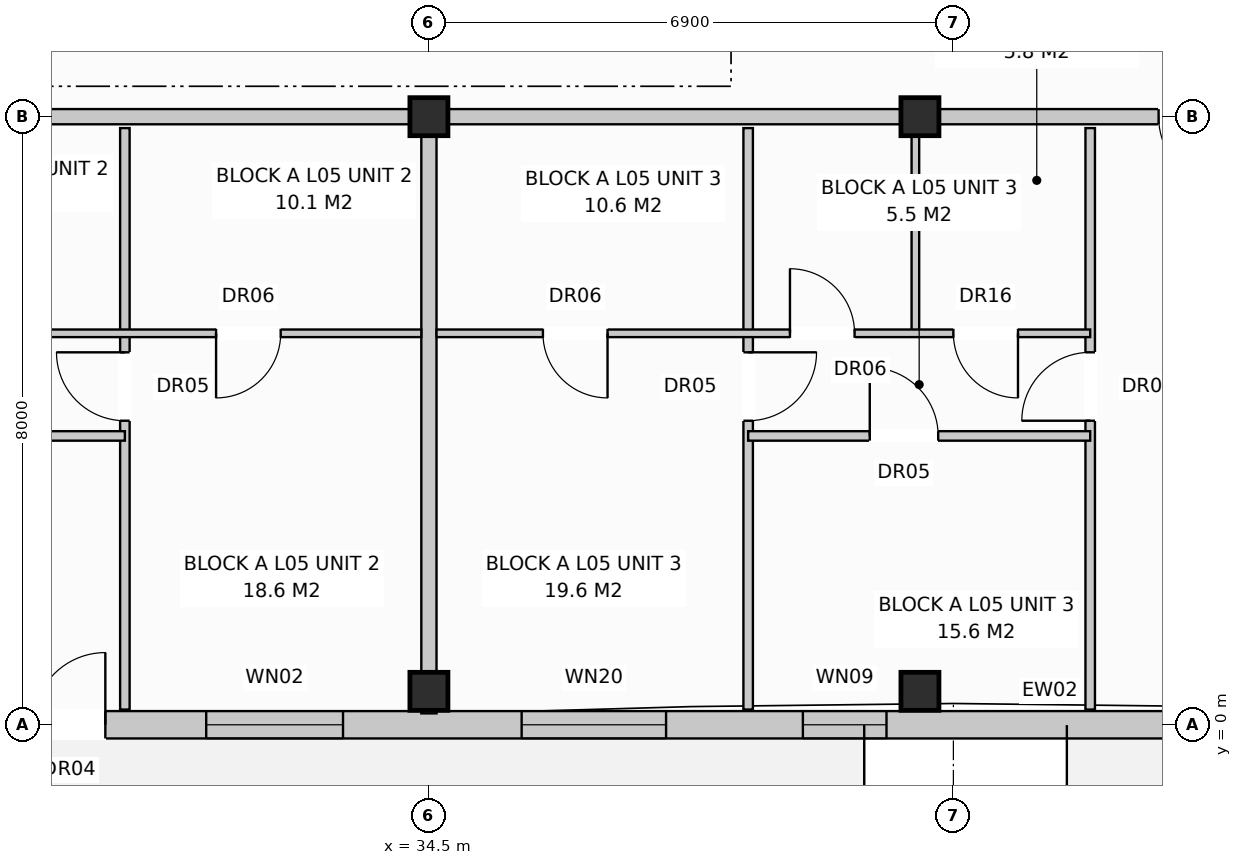
"""IFC4 building model, lengths in metres.
Left out: names, types, materials, properties, quantities, classifications, styles, units other than length and angle.
Written with IfcOpenShell. Run it as: python <this file> out.ifc"""

import sys

from ifc_helpers import new_model, si_unit, direction, frame, frame_2d, origin, origin_with_axes, origin_2d, place, context, subcontext, project, spatial, rectangle, extrude, element, fill, save


model = new_model("IFC4")
c1 = context("Model", 3, precision=1e-05, world=origin(), true_north=direction((0.0, 1.0)))
c2 = subcontext(c1, "Body", "Model", "MODEL_VIEW")
j1 = project(units=[si_unit("LENGTHUNIT", "METRE"), si_unit("PLANEANGLEUNIT", "RADIAN")], contexts=[c1])
p1 = place(None, origin())
s1 = spatial("IfcSite", under=j1, at=p1, CompositionType="ELEMENT")
p2 = place(p1, origin())
s2 = spatial("IfcBuilding", under=s1, at=p2, CompositionType="ELEMENT")
p3 = place(p2, frame((0.0, 0.0, 17.6)))
s3 = spatial("IfcBuildingStorey", under=s2, at=p3, CompositionType="ELEMENT", Elevation=17.6)
for number, where, z_axis, x_axis in (
    (1, (34.5, 0.44, 0.0), (0.0, 0.0, 1.0), (1.0, 0.0, 0.0)),
    (2, (34.5, 8.0, 0.0), (0.0, 0.0, 1.0), (1.0, 0.0, 0.0)),
    (3, (40.96, 0.44, 0.0), (0.0, 0.0, 1.0), (1.0, 0.0, 0.0)),
    (4, (40.96, 8.0, 0.0), (0.0, 0.0, 1.0), (1.0, 0.0, 0.0)),
):
    element("IfcColumn", number, at=place(p3, frame(where, z_axis=z_axis, x_axis=x_axis)), inside=s3, PredefinedType="COLUMN", context=c2, shape_type="SweptSolid", body=[
        extrude(rectangle(XDim=0.5, YDim=0.5, at=origin_2d()), origin(), (0.0, 0.0, 1.0), 3.2),
    ])
p4 = place(p3, frame((0.17, 0.0, 0.0), z_axis=(0.0, 0.0, 1.0), x_axis=(1.0, 0.0, 0.0)))
e5 = element("IfcWall", 5, at=p4, inside=s3, PredefinedType="STANDARD", context=c2, shape_type="SweptSolid", body=[
    extrude(rectangle(XDim=54.86, YDim=0.36, at=frame_2d((27.43, 0.0))), origin(), (0.0, 0.0, 1.0), 2.95),
])
p5 = place(p4, frame((3.823, 0.0, 0.0)))
e6 = element("IfcOpeningElement", 6, at=p5, cuts=e5, PredefinedType="OPENING", context=c2, shape_type="SweptSolid", body=[
    extrude(rectangle(XDim=0.95, YDim=2.1, at=frame_2d((0.475, 1.05))), frame((0.0, 0.192, 0.0), z_axis=(0.0, -1.0, 0.0), x_axis=(1.0, 0.0, 0.0)), (0.0, 0.0, 1.0), 0.384),
])
p6 = place(p4, frame((18.723, 0.0, 0.0)))
e7 = element("IfcOpeningElement", 7, at=p6, cuts=e5, PredefinedType="OPENING", context=c2, shape_type="SweptSolid", body=[
    extrude(rectangle(XDim=0.95, YDim=2.1, at=frame_2d((0.475, 1.05))), frame((0.0, 0.192, 0.0), z_axis=(0.0, -1.0, 0.0), x_axis=(1.0, 0.0, 0.0)), (0.0, 0.0, 1.0), 0.384),
])
p7 = place(p4, frame((29.123, 0.0, 0.0)))
e8 = element("IfcOpeningElement", 8, at=p7, cuts=e5, PredefinedType="OPENING", context=c2, shape_type="SweptSolid", body=[
    extrude(rectangle(XDim=0.95, YDim=2.1, at=frame_2d((0.475, 1.05))), frame((0.0, 0.192, 0.0), z_axis=(0.0, -1.0, 0.0), x_axis=(1.0, 0.0, 0.0)), (0.0, 0.0, 1.0), 0.384),
])
p8 = place(p4, frame((46.5, 0.0, 0.0)))
e9 = element("IfcOpeningElement", 9, at=p8, cuts=e5, PredefinedType="OPENING", context=c2, shape_type="SweptSolid", body=[
    extrude(rectangle(XDim=0.95, YDim=2.1, at=frame_2d((0.475, 1.05))), frame((0.0, 0.192, 0.0), z_axis=(0.0, -1.0, 0.0), x_axis=(1.0, 0.0, 0.0)), (0.0, 0.0, 1.0), 0.384),
])
p9 = place(p4, frame((1.6, 0.0, 0.8)))
e10 = element("IfcOpeningElement", 10, at=p9, cuts=e5, PredefinedType="OPENING", context=c2, shape_type="SweptSolid", body=[
    extrude(rectangle(XDim=1.8, YDim=1.7, at=frame_2d((0.9, 0.85))), frame((0.0, 0.192, 0.0), z_axis=(0.0, -1.0, 0.0), x_axis=(1.0, 0.0, 0.0)), (0.0, 0.0, 1.0), 0.384),
])
p10 = place(p4, frame((7.232, 0.0, 0.72)))
e11 = element("IfcOpeningElement", 11, at=p10, cuts=e5, PredefinedType="OPENING", context=c2, shape_type="SweptSolid", body=[
    extrude(rectangle(XDim=1.9, YDim=1.85, at=frame_2d((0.95, 0.925))), frame((0.0, 0.192, 0.0), z_axis=(0.0, -1.0, 0.0), x_axis=(1.0, 0.0, 0.0)), (0.0, 0.0, 1.0), 0.384),
])
p11 = place(p4, frame((10.425, 0.0, 0.8)))
e12 = element("IfcOpeningElement", 12, at=p11, cuts=e5, PredefinedType="OPENING", context=c2, shape_type="SweptSolid", body=[
    extrude(rectangle(XDim=1.95, YDim=1.65, at=frame_2d((0.975, 0.825))), frame((0.0, 0.192, 0.0), z_axis=(0.0, -1.0, 0.0), x_axis=(1.0, 0.0, 0.0)), (0.0, 0.0, 1.0), 0.384),
])
p12 = place(p4, frame((15.9, 0.0, 0.8)))
e13 = element("IfcOpeningElement", 13, at=p12, cuts=e5, PredefinedType="OPENING", context=c2, shape_type="SweptSolid", body=[
    extrude(rectangle(XDim=1.8, YDim=1.7, at=frame_2d((0.9, 0.85))), frame((0.0, 0.192, 0.0), z_axis=(0.0, -1.0, 0.0), x_axis=(1.0, 0.0, 0.0)), (0.0, 0.0, 1.0), 0.384),
])
p13 = place(p4, frame((21.55, 0.0, 0.72)))
e14 = element("IfcOpeningElement", 14, at=p13, cuts=e5, PredefinedType="OPENING", context=c2, shape_type="SweptSolid", body=[
    extrude(rectangle(XDim=1.9, YDim=1.85, at=frame_2d((0.95, 0.925))), frame((0.0, 0.192, 0.0), z_axis=(0.0, -1.0, 0.0), x_axis=(1.0, 0.0, 0.0)), (0.0, 0.0, 1.0), 0.384),
])
p14 = place(p4, frame((25.6, 0.0, 0.72)))
e15 = element("IfcOpeningElement", 15, at=p14, cuts=e5, PredefinedType="OPENING", context=c2, shape_type="SweptSolid", body=[
    extrude(rectangle(XDim=1.1, YDim=1.5, at=frame_2d((0.55, 0.75))), frame((0.0, 0.192, 0.0), z_axis=(0.0, -1.0, 0.0), x_axis=(1.0, 0.0, 0.0)), (0.0, 0.0, 1.0), 0.384),
])
p15 = place(p4, frame((31.4, 0.0, 0.8)))
e16 = element("IfcOpeningElement", 16, at=p15, cuts=e5, PredefinedType="OPENING", context=c2, shape_type="SweptSolid", body=[
    extrude(rectangle(XDim=1.8, YDim=1.7, at=frame_2d((0.9, 0.85))), frame((0.0, 0.192, 0.0), z_axis=(0.0, -1.0, 0.0), x_axis=(1.0, 0.0, 0.0)), (0.0, 0.0, 1.0), 0.384),
])
p16 = place(p4, frame((35.55, 0.0, 0.72)))
e17 = element("IfcOpeningElement", 17, at=p16, cuts=e5, PredefinedType="OPENING", context=c2, shape_type="SweptSolid", body=[
    extrude(rectangle(XDim=1.9, YDim=1.85, at=frame_2d((0.95, 0.925))), frame((0.0, 0.192, 0.0), z_axis=(0.0, -1.0, 0.0), x_axis=(1.0, 0.0, 0.0)), (0.0, 0.0, 1.0), 0.384),
])
p17 = place(p4, frame((39.25, 0.0, 0.72)))
e18 = element("IfcOpeningElement", 18, at=p17, cuts=e5, PredefinedType="OPENING", context=c2, shape_type="SweptSolid", body=[
    extrude(rectangle(XDim=1.1, YDim=1.5, at=frame_2d((0.55, 0.75))), frame((0.0, 0.192, 0.0), z_axis=(0.0, -1.0, 0.0), x_axis=(1.0, 0.0, 0.0)), (0.0, 0.0, 1.0), 0.384),
])
p18 = place(p4, frame((44.4, 0.0, 0.8)))
e19 = element("IfcOpeningElement", 19, at=p18, cuts=e5, PredefinedType="OPENING", context=c2, shape_type="SweptSolid", body=[
    extrude(rectangle(XDim=1.8, YDim=1.7, at=frame_2d((0.9, 0.85))), frame((0.0, 0.192, 0.0), z_axis=(0.0, -1.0, 0.0), x_axis=(1.0, 0.0, 0.0)), (0.0, 0.0, 1.0), 0.384),
])
p19 = place(p4, frame((49.15, 0.0, 0.72)))
e20 = element("IfcOpeningElement", 20, at=p19, cuts=e5, PredefinedType="OPENING", context=c2, shape_type="SweptSolid", body=[
    extrude(rectangle(XDim=1.9, YDim=1.85, at=frame_2d((0.95, 0.925))), frame((0.0, 0.192, 0.0), z_axis=(0.0, -1.0, 0.0), x_axis=(1.0, 0.0, 0.0)), (0.0, 0.0, 1.0), 0.384),
])
p20 = place(p4, frame((52.95, 0.0, 0.72)))
e21 = element("IfcOpeningElement", 21, at=p20, cuts=e5, PredefinedType="OPENING", context=c2, shape_type="SweptSolid", body=[
    extrude(rectangle(XDim=1.1, YDim=1.5, at=frame_2d((0.55, 0.75))), frame((0.0, 0.192, 0.0), z_axis=(0.0, -1.0, 0.0), x_axis=(1.0, 0.0, 0.0)), (0.0, 0.0, 1.0), 0.384),
])
p21 = place(p3, frame((34.5, 7.85, 0.0), z_axis=(0.0, 0.0, 1.0), x_axis=(0.0, -1.0, 0.0)))
e22 = element("IfcWall", 22, at=p21, inside=s3, PredefinedType="PARTITIONING", context=c2, shape_type="SweptSolid", body=[
    extrude(rectangle(XDim=7.7, YDim=0.2, at=frame_2d((3.85, 0.0))), origin(), (0.0, 0.0, 1.0), 2.95),
])
p22 = place(p3, frame((13.8, 8.0, 0.0), z_axis=(0.0, 0.0, 1.0), x_axis=(1.0, 0.0, 0.0)))
e23 = element("IfcWall", 23, at=p22, inside=s3, PredefinedType="PARTITIONING", context=c2, shape_type="SweptSolid", body=[
    extrude(rectangle(XDim=20.7, YDim=0.2, at=frame_2d((10.35, 0.0))), origin(), (0.0, 0.0, 1.0), 2.39),
])
p23 = place(p22, frame((2.4, 0.0, 0.0)))
e24 = element("IfcOpeningElement", 24, at=p23, cuts=e23, PredefinedType="OPENING", context=c2, shape_type="SweptSolid", body=[
    extrude(rectangle(XDim=0.95, YDim=2.15, at=frame_2d((0.475, 1.075))), frame((0.0, 0.112, 0.0), z_axis=(0.0, -1.0, 0.0), x_axis=(1.0, 0.0, 0.0)), (0.0, 0.0, 1.0), 0.224),
])
p24 = place(p3, frame((30.5, 7.85, 0.0), z_axis=(0.0, 0.0, 1.0), x_axis=(0.0, -1.0, 0.0)))
e25 = element("IfcWall", 25, at=p24, inside=s3, PredefinedType="PARTITIONING", context=c2, shape_type="SweptSolid", body=[
    extrude(rectangle(XDim=7.65, YDim=0.125, at=frame_2d((3.825, 0.0))), origin(), (0.0, 0.0, 1.0), 2.95),
])
p25 = place(p24, frame((2.95, 0.0, 0.0)))
e26 = element("IfcOpeningElement", 26, at=p25, cuts=e25, PredefinedType="OPENING", context=c2, shape_type="SweptSolid", body=[
    extrude(rectangle(XDim=0.9, YDim=2.1, at=frame_2d((0.45, 1.05))), frame((0.0, 0.074, 0.0), z_axis=(0.0, -1.0, 0.0), x_axis=(1.0, 0.0, 0.0)), (0.0, 0.0, 1.0), 0.149),
])
p26 = place(p3, frame((20.1, 5.15, 0.0), z_axis=(0.0, 0.0, 1.0), x_axis=(1.0, 0.0, 0.0)))
e27 = element("IfcWall", 27, at=p26, inside=s3, PredefinedType="PARTITIONING", context=c2, shape_type="SweptSolid", body=[
    extrude(rectangle(XDim=14.3, YDim=0.1, at=frame_2d((7.15, 0.0))), origin(), (0.0, 0.0, 1.0), 2.95),
])
p27 = place(p26, frame((1.6, 0.0, 0.0)))
e28 = element("IfcOpeningElement", 28, at=p27, cuts=e27, PredefinedType="OPENING", context=c2, shape_type="SweptSolid", body=[
    extrude(rectangle(XDim=0.9, YDim=2.1, at=frame_2d((0.45, 1.05))), frame((0.0, 0.062, 0.0), z_axis=(0.0, -1.0, 0.0), x_axis=(1.0, 0.0, 0.0)), (0.0, 0.0, 1.0), 0.124),
])
p28 = place(p26, frame((5.1, 0.0, 0.0)))
e29 = element("IfcOpeningElement", 29, at=p28, cuts=e27, PredefinedType="OPENING", context=c2, shape_type="SweptSolid", body=[
    extrude(rectangle(XDim=0.85, YDim=2.05, at=frame_2d((0.425, 1.025))), frame((0.0, 0.062, 0.0), z_axis=(0.0, -1.0, 0.0), x_axis=(1.0, 0.0, 0.0)), (0.0, 0.0, 1.0), 0.124),
])
p29 = place(p26, frame((8.2, 0.0, 0.0)))
e30 = element("IfcOpeningElement", 30, at=p29, cuts=e27, PredefinedType="OPENING", context=c2, shape_type="SweptSolid", body=[
    extrude(rectangle(XDim=0.85, YDim=2.05, at=frame_2d((0.425, 1.025))), frame((0.0, 0.062, 0.0), z_axis=(0.0, -1.0, 0.0), x_axis=(1.0, 0.0, 0.0)), (0.0, 0.0, 1.0), 0.124),
])
p30 = place(p26, frame((11.6, 0.0, 0.0)))
e31 = element("IfcOpeningElement", 31, at=p30, cuts=e27, PredefinedType="OPENING", context=c2, shape_type="SweptSolid", body=[
    extrude(rectangle(XDim=0.85, YDim=2.05, at=frame_2d((0.425, 1.025))), frame((0.0, 0.062, 0.0), z_axis=(0.0, -1.0, 0.0), x_axis=(1.0, 0.0, 0.0)), (0.0, 0.0, 1.0), 0.124),
])
p31 = place(p3, frame((20.1, 3.8, 0.0), z_axis=(0.0, 0.0, 1.0), x_axis=(1.0, 0.0, 0.0)))
e32 = element("IfcWall", 32, at=p31, inside=s3, PredefinedType="PARTITIONING", context=c2, shape_type="SweptSolid", body=[
    extrude(rectangle(XDim=10.4, YDim=0.125, at=frame_2d((5.2, 0.0))), origin(), (0.0, 0.0, 1.0), 2.95),
])
p32 = place(p31, frame((2.0, 0.0, 0.0)))
e33 = element("IfcOpeningElement", 33, at=p32, cuts=e32, PredefinedType="OPENING", context=c2, shape_type="SweptSolid", body=[
    extrude(rectangle(XDim=0.9, YDim=2.1, at=frame_2d((0.45, 1.05))), frame((0.0, 0.074, 0.0), z_axis=(0.0, -1.0, 0.0), x_axis=(1.0, 0.0, 0.0)), (0.0, 0.0, 1.0), 0.149),
])
p33 = place(p31, frame((7.2, 0.0, 0.0)))
e34 = element("IfcOpeningElement", 34, at=p33, cuts=e32, PredefinedType="OPENING", context=c2, shape_type="SweptSolid", body=[
    extrude(rectangle(XDim=0.9, YDim=2.1, at=frame_2d((0.45, 1.05))), frame((0.0, 0.074, 0.0), z_axis=(0.0, -1.0, 0.0), x_axis=(1.0, 0.0, 0.0)), (0.0, 0.0, 1.0), 0.149),
])
p34 = place(p3, frame((34.5, 8.0, 0.0), z_axis=(0.0, 0.0, 1.0), x_axis=(1.0, 0.0, 0.0)))
e35 = element("IfcWall", 35, at=p34, inside=s3, PredefinedType="PARTITIONING", context=c2, shape_type="SweptSolid", body=[
    extrude(rectangle(XDim=13.8, YDim=0.2, at=frame_2d((6.9, 0.0))), origin(), (0.0, 0.0, 1.0), 2.39),
])
p35 = place(p34, frame((9.6, 0.0, 0.0)))
e36 = element("IfcOpeningElement", 36, at=p35, cuts=e35, PredefinedType="OPENING", context=c2, shape_type="SweptSolid", body=[
    extrude(rectangle(XDim=0.95, YDim=2.15, at=frame_2d((0.475, 1.075))), frame((0.0, 0.112, 0.0), z_axis=(0.0, -1.0, 0.0), x_axis=(1.0, 0.0, 0.0)), (0.0, 0.0, 1.0), 0.224),
])
p36 = place(p3, frame((43.2, 7.85, 0.0), z_axis=(0.0, 0.0, 1.0), x_axis=(0.0, -1.0, 0.0)))
e37 = element("IfcWall", 37, at=p36, inside=s3, PredefinedType="PARTITIONING", context=c2, shape_type="SweptSolid", body=[
    extrude(rectangle(XDim=7.65, YDim=0.125, at=frame_2d((3.825, 0.0))), origin(), (0.0, 0.0, 1.0), 2.95),
])
p37 = place(p36, frame((2.95, 0.0, 0.0)))
e38 = element("IfcOpeningElement", 38, at=p37, cuts=e37, PredefinedType="OPENING", context=c2, shape_type="SweptSolid", body=[
    extrude(rectangle(XDim=0.9, YDim=2.1, at=frame_2d((0.45, 1.05))), frame((0.0, 0.074, 0.0), z_axis=(0.0, -1.0, 0.0), x_axis=(1.0, 0.0, 0.0)), (0.0, 0.0, 1.0), 0.149),
])
p38 = place(p3, frame((38.7, 7.85, 0.0), z_axis=(0.0, 0.0, 1.0), x_axis=(0.0, -1.0, 0.0)))
e39 = element("IfcWall", 39, at=p38, inside=s3, PredefinedType="PARTITIONING", context=c2, shape_type="SweptSolid", body=[
    extrude(rectangle(XDim=7.65, YDim=0.125, at=frame_2d((3.825, 0.0))), origin(), (0.0, 0.0, 1.0), 2.95),
])
p39 = place(p38, frame((2.95, 0.0, 0.0)))
e40 = element("IfcOpeningElement", 40, at=p39, cuts=e39, PredefinedType="OPENING", context=c2, shape_type="SweptSolid", body=[
    extrude(rectangle(XDim=0.9, YDim=2.1, at=frame_2d((0.45, 1.05))), frame((0.0, 0.074, 0.0), z_axis=(0.0, -1.0, 0.0), x_axis=(1.0, 0.0, 0.0)), (0.0, 0.0, 1.0), 0.149),
])
p40 = place(p3, frame((40.9, 7.85, 0.0), z_axis=(0.0, 0.0, 1.0), x_axis=(0.0, -1.0, 0.0)))
e41 = element("IfcWall", 41, at=p40, inside=s3, PredefinedType="PARTITIONING", context=c2, shape_type="SweptSolid", body=[
    extrude(rectangle(XDim=2.7, YDim=0.1, at=frame_2d((1.35, 0.0))), origin(), (0.0, 0.0, 1.0), 2.59),
])
p41 = place(p3, frame((34.6, 5.15, 0.0), z_axis=(0.0, 0.0, 1.0), x_axis=(1.0, 0.0, 0.0)))
e42 = element("IfcWall", 42, at=p41, inside=s3, PredefinedType="PARTITIONING", context=c2, shape_type="SweptSolid", body=[
    extrude(rectangle(XDim=8.6, YDim=0.1, at=frame_2d((4.3, 0.0))), origin(), (0.0, 0.0, 1.0), 2.95),
])
p42 = place(p41, frame((1.4, 0.0, 0.0)))
e43 = element("IfcOpeningElement", 43, at=p42, cuts=e42, PredefinedType="OPENING", context=c2, shape_type="SweptSolid", body=[
    extrude(rectangle(XDim=0.85, YDim=2.05, at=frame_2d((0.425, 1.025))), frame((0.0, 0.062, 0.0), z_axis=(0.0, -1.0, 0.0), x_axis=(1.0, 0.0, 0.0)), (0.0, 0.0, 1.0), 0.124),
])
p43 = place(p41, frame((4.65, 0.0, 0.0)))
e44 = element("IfcOpeningElement", 44, at=p43, cuts=e42, PredefinedType="OPENING", context=c2, shape_type="SweptSolid", body=[
    extrude(rectangle(XDim=0.85, YDim=2.05, at=frame_2d((0.425, 1.025))), frame((0.0, 0.062, 0.0), z_axis=(0.0, -1.0, 0.0), x_axis=(1.0, 0.0, 0.0)), (0.0, 0.0, 1.0), 0.124),
])
p44 = place(p41, frame((6.8, 0.0, 0.0)))
e45 = element("IfcOpeningElement", 45, at=p44, cuts=e42, PredefinedType="OPENING", context=c2, shape_type="SweptSolid", body=[
    extrude(rectangle(XDim=0.85, YDim=2.1, at=frame_2d((0.425, 1.05))), frame((0.0, 0.062, 0.0), z_axis=(0.0, -1.0, 0.0), x_axis=(1.0, 0.0, 0.0)), (0.0, 0.0, 1.0), 0.124),
])
p45 = place(p3, frame((38.7, 3.8, 0.0), z_axis=(0.0, 0.0, 1.0), x_axis=(1.0, 0.0, 0.0)))
e46 = element("IfcWall", 46, at=p45, inside=s3, PredefinedType="PARTITIONING", context=c2, shape_type="SweptSolid", body=[
    extrude(rectangle(XDim=4.5, YDim=0.125, at=frame_2d((2.25, 0.0))), origin(), (0.0, 0.0, 1.0), 2.95),
])
p46 = place(p45, frame((1.6, 0.0, 0.0)))
e47 = element("IfcOpeningElement", 47, at=p46, cuts=e46, PredefinedType="OPENING", context=c2, shape_type="SweptSolid", body=[
    extrude(rectangle(XDim=0.9, YDim=2.1, at=frame_2d((0.45, 1.05))), frame((0.0, 0.074, 0.0), z_axis=(0.0, -1.0, 0.0), x_axis=(1.0, 0.0, 0.0)), (0.0, 0.0, 1.0), 0.149),
])
p47 = place(p7, origin_with_axes())
e48 = element("IfcDoor", 48, at=p47, inside=s3, OperationType="SINGLE_SWING_RIGHT", PredefinedType="DOOR", context=c2, shape_type="SweptSolid", body=[
    extrude(rectangle(XDim=0.95, YDim=2.1, at=frame_2d((0.475, 1.05))), frame((0.0, 0.025, 0.0), z_axis=(0.0, -1.0, 0.0), x_axis=(1.0, 0.0, 0.0)), (0.0, 0.0, 1.0), 0.05),
])
fill(e8, e48)
p48 = place(p15, origin_with_axes())
e49 = element("IfcWindow", 49, at=p48, inside=s3, PartitioningType="SINGLE_PANEL", PredefinedType="WINDOW", context=c2, shape_type="SweptSolid", body=[
    extrude(rectangle(XDim=1.8, YDim=1.7, at=frame_2d((0.9, 0.85))), frame((0.0, 0.03, 0.0), z_axis=(0.0, -1.0, 0.0), x_axis=(1.0, 0.0, 0.0)), (0.0, 0.0, 1.0), 0.06),
])
fill(e16, e49)
p49 = place(p16, origin_with_axes())
e50 = element("IfcWindow", 50, at=p49, inside=s3, PartitioningType="SINGLE_PANEL", PredefinedType="WINDOW", context=c2, shape_type="SweptSolid", body=[
    extrude(rectangle(XDim=1.9, YDim=1.85, at=frame_2d((0.95, 0.925))), frame((0.0, 0.03, 0.0), z_axis=(0.0, -1.0, 0.0), x_axis=(1.0, 0.0, 0.0)), (0.0, 0.0, 1.0), 0.06),
])
fill(e17, e50)
p50 = place(p17, origin_with_axes())
e51 = element("IfcWindow", 51, at=p50, inside=s3, PartitioningType="SINGLE_PANEL", PredefinedType="WINDOW", context=c2, shape_type="SweptSolid", body=[
    extrude(rectangle(XDim=1.1, YDim=1.5, at=frame_2d((0.55, 0.75))), frame((0.0, 0.03, 0.0), z_axis=(0.0, -1.0, 0.0), x_axis=(1.0, 0.0, 0.0)), (0.0, 0.0, 1.0), 0.06),
])
fill(e18, e51)
p51 = place(p25, frame((0.9, 0.0, 0.0), z_axis=(0.0, 0.0, 1.0), x_axis=(-1.0, 0.0, 0.0)))
e52 = element("IfcDoor", 52, at=p51, inside=s3, OperationType="SINGLE_SWING_LEFT", PredefinedType="DOOR", context=c2, shape_type="SweptSolid", body=[
    extrude(rectangle(XDim=0.9, YDim=2.1, at=frame_2d((0.45, 1.05))), frame((0.0, 0.025, 0.0), z_axis=(0.0, -1.0, 0.0), x_axis=(1.0, 0.0, 0.0)), (0.0, 0.0, 1.0), 0.05),
])
fill(e26, e52)
p52 = place(p30, frame((0.85, 0.0, 0.0), z_axis=(0.0, 0.0, 1.0), x_axis=(-1.0, 0.0, 0.0)))
e53 = element("IfcDoor", 53, at=p52, inside=s3, OperationType="SINGLE_SWING_LEFT", PredefinedType="DOOR", context=c2, shape_type="SweptSolid", body=[
    extrude(rectangle(XDim=0.85, YDim=2.05, at=frame_2d((0.425, 1.025))), frame((0.0, 0.025, 0.0), z_axis=(0.0, -1.0, 0.0), x_axis=(1.0, 0.0, 0.0)), (0.0, 0.0, 1.0), 0.05),
])
fill(e31, e53)
p53 = place(p35, frame((0.95, 0.0, 0.0), z_axis=(0.0, 0.0, 1.0), x_axis=(-1.0, 0.0, 0.0)))
e54 = element("IfcDoor", 54, at=p53, inside=s3, OperationType="SINGLE_SWING_RIGHT", PredefinedType="DOOR", context=c2, shape_type="SweptSolid", body=[
    extrude(rectangle(XDim=0.95, YDim=2.15, at=frame_2d((0.475, 1.075))), frame((0.0, 0.025, 0.0), z_axis=(0.0, -1.0, 0.0), x_axis=(1.0, 0.0, 0.0)), (0.0, 0.0, 1.0), 0.05),
])
fill(e36, e54)
p54 = place(p37, frame((0.9, 0.0, 0.0), z_axis=(0.0, 0.0, 1.0), x_axis=(-1.0, 0.0, 0.0)))
e55 = element("IfcDoor", 55, at=p54, inside=s3, OperationType="SINGLE_SWING_RIGHT", PredefinedType="DOOR", context=c2, shape_type="SweptSolid", body=[
    extrude(rectangle(XDim=0.9, YDim=2.1, at=frame_2d((0.45, 1.05))), frame((0.0, 0.025, 0.0), z_axis=(0.0, -1.0, 0.0), x_axis=(1.0, 0.0, 0.0)), (0.0, 0.0, 1.0), 0.05),
])
fill(e38, e55)
p55 = place(p39, origin_with_axes())
e56 = element("IfcDoor", 56, at=p55, inside=s3, OperationType="SINGLE_SWING_LEFT", PredefinedType="DOOR", context=c2, shape_type="SweptSolid", body=[
    extrude(rectangle(XDim=0.9, YDim=2.1, at=frame_2d((0.45, 1.05))), frame((0.0, 0.025, 0.0), z_axis=(0.0, -1.0, 0.0), x_axis=(1.0, 0.0, 0.0)), (0.0, 0.0, 1.0), 0.05),
])
fill(e40, e56)
p56 = place(p42, frame((0.85, 0.0, 0.0), z_axis=(0.0, 0.0, 1.0), x_axis=(-1.0, 0.0, 0.0)))
e57 = element("IfcDoor", 57, at=p56, inside=s3, OperationType="SINGLE_SWING_RIGHT", PredefinedType="DOOR", context=c2, shape_type="SweptSolid", body=[
    extrude(rectangle(XDim=0.85, YDim=2.05, at=frame_2d((0.425, 1.025))), frame((0.0, 0.025, 0.0), z_axis=(0.0, -1.0, 0.0), x_axis=(1.0, 0.0, 0.0)), (0.0, 0.0, 1.0), 0.05),
])
fill(e43, e57)
p57 = place(p43, origin_with_axes())
e58 = element("IfcDoor", 58, at=p57, inside=s3, OperationType="SINGLE_SWING_LEFT", PredefinedType="DOOR", context=c2, shape_type="SweptSolid", body=[
    extrude(rectangle(XDim=0.85, YDim=2.05, at=frame_2d((0.425, 1.025))), frame((0.0, 0.025, 0.0), z_axis=(0.0, -1.0, 0.0), x_axis=(1.0, 0.0, 0.0)), (0.0, 0.0, 1.0), 0.05),
])
fill(e44, e58)
p58 = place(p44, frame((0.85, 0.0, 0.0), z_axis=(0.0, 0.0, 1.0), x_axis=(-1.0, 0.0, 0.0)))
e59 = element("IfcDoor", 59, at=p58, inside=s3, OperationType="SINGLE_SWING_RIGHT", PredefinedType="DOOR", context=c2, shape_type="SweptSolid", body=[
    extrude(rectangle(XDim=0.85, YDim=2.1, at=frame_2d((0.425, 1.05))), frame((0.0, 0.025, 0.0), z_axis=(0.0, -1.0, 0.0), x_axis=(1.0, 0.0, 0.0)), (0.0, 0.0, 1.0), 0.05),
])
fill(e45, e59)
p59 = place(p46, origin_with_axes())
e60 = element("IfcDoor", 60, at=p59, inside=s3, OperationType="SINGLE_SWING_LEFT", PredefinedType="DOOR", context=c2, shape_type="SweptSolid", body=[
    extrude(rectangle(XDim=0.9, YDim=2.1, at=frame_2d((0.45, 1.05))), frame((0.0, 0.025, 0.0), z_axis=(0.0, -1.0, 0.0), x_axis=(1.0, 0.0, 0.0)), (0.0, 0.0, 1.0), 0.05),
])
fill(e47, e60)
save(model, sys.argv[1])
